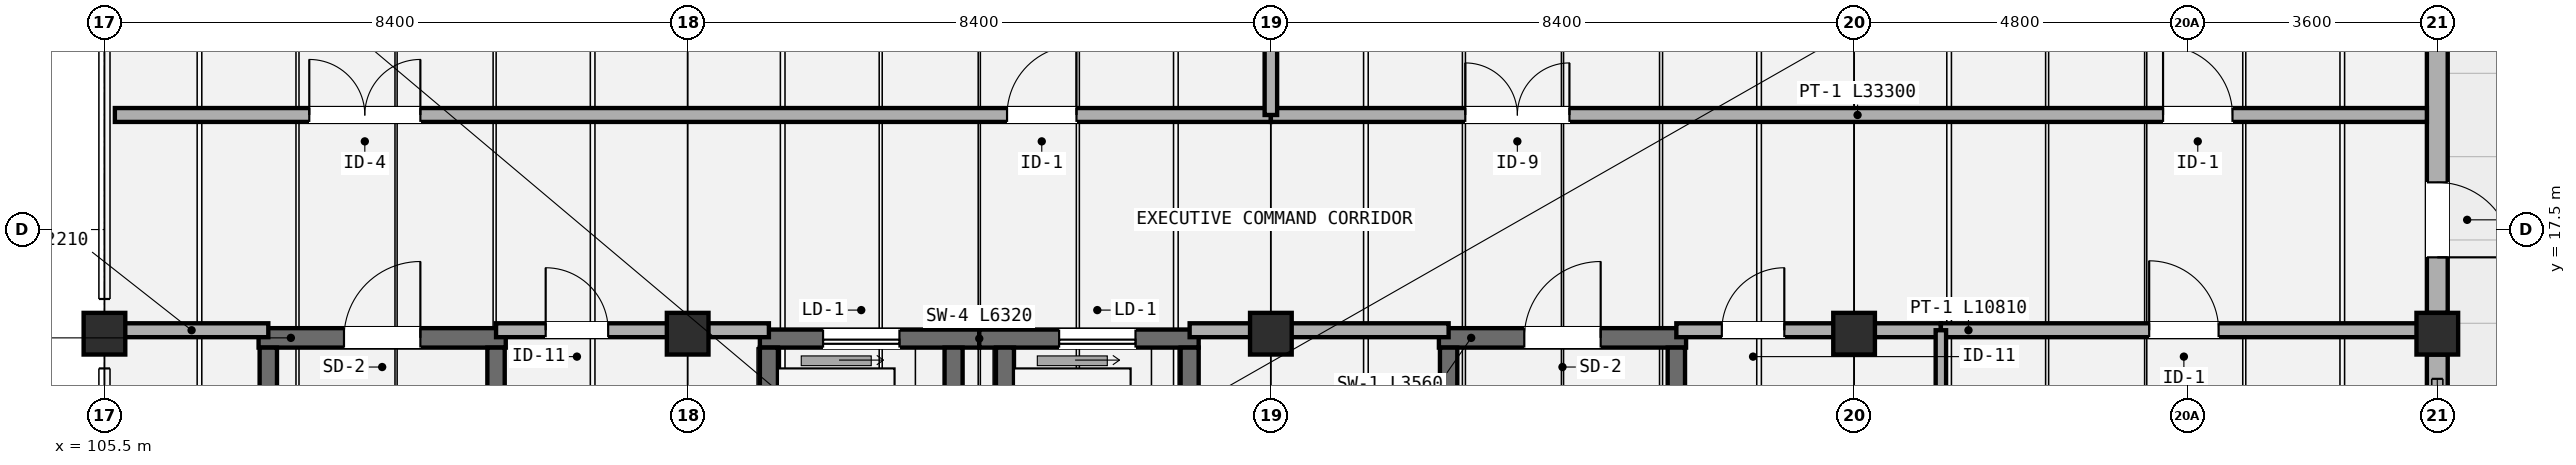
"""IFC4 building model, lengths in metres.
Left out: names, types, materials, properties, quantities, classifications, styles, units other than length and angle.
Written with IfcOpenShell. Run it as: python <this file> out.ifc"""

import sys

from ifc_helpers import new_model, si_unit, direction, frame, frame_2d, origin, origin_2d, place, context, subcontext, project, spatial, rectangle, extrude, element, fill, save


model = new_model("IFC4")
c1 = context("Model", 3, precision=1e-05, world=origin(), true_north=direction((0.0, 1.0)))
c2 = subcontext(c1, "Body", "Model", "MODEL_VIEW")
j1 = project(units=[si_unit("LENGTHUNIT", "METRE"), si_unit("PLANEANGLEUNIT", "RADIAN")], contexts=[c1])
p1 = place(None, origin())
s1 = spatial("IfcSite", under=j1, at=p1, CompositionType="ELEMENT")
p2 = place(p1, origin())
s2 = spatial("IfcBuilding", under=s1, at=p2, CompositionType="ELEMENT")
p3 = place(p2, frame((0.0, 0.0, 12.75)))
s3 = spatial("IfcBuildingStorey", under=s2, at=p3, CompositionType="ELEMENT", Elevation=12.75)
for number, where, z_axis, x_axis in (
    (1, (105.5, 16.0, 0.0), (0.0, 0.0, 1.0), (1.0, 0.0, 0.0)),
    (2, (113.9, 16.0, 0.0), (0.0, 0.0, 1.0), (1.0, 0.0, 0.0)),
    (3, (122.3, 16.0, 0.0), (0.0, 0.0, 1.0), (1.0, 0.0, 0.0)),
    (4, (130.7, 16.0, 0.0), (0.0, 0.0, 1.0), (1.0, 0.0, 0.0)),
    (5, (139.1, 16.0, 0.0), (0.0, 0.0, 1.0), (1.0, 0.0, 0.0)),
):
    element("IfcColumn", number, at=place(p3, frame(where, z_axis=z_axis, x_axis=x_axis)), inside=s3, PredefinedType="COLUMN", context=c2, shape_type="SweptSolid", body=[
        extrude(rectangle(XDim=0.6, YDim=0.6, at=origin_2d()), origin(), (0.0, 0.0, 1.0), 3.0),
    ])
p4 = place(p3, frame((139.1, 9.3, 0.0), z_axis=(0.0, 0.0, 1.0), x_axis=(0.0, 1.0, 0.0)))
e6 = element("IfcWall", 6, at=p4, inside=s3, PredefinedType="STANDARD", context=c2, shape_type="SweptSolid", body=[
    extrude(rectangle(XDim=6.4, YDim=0.3, at=frame_2d((3.2, 0.0))), origin(), (0.0, 0.0, 1.0), 2.35),
])
p5 = place(p3, frame((139.1, 16.3, 0.0), z_axis=(0.0, 0.0, 1.0), x_axis=(0.0, 1.0, 0.0)))
e7 = element("IfcWall", 7, at=p5, inside=s3, PredefinedType="STANDARD", context=c2, shape_type="SweptSolid", body=[
    extrude(rectangle(XDim=7.9, YDim=0.3, at=frame_2d((3.95, 0.0))), origin(), (0.0, 0.0, 1.0), 2.35),
])
p6 = place(p5, frame((0.8, 0.0, 0.0)))
e8 = element("IfcOpeningElement", 8, at=p6, cuts=e7, PredefinedType="OPENING", context=c2, shape_type="SweptSolid", body=[
    extrude(rectangle(XDim=1.08, YDim=2.1, at=frame_2d((0.54, 1.05))), frame((0.0, 0.16, 0.0), z_axis=(0.0, -1.0, 0.0), x_axis=(1.0, 0.0, 0.0)), (0.0, 0.0, 1.0), 0.32),
])
p7 = place(p5, frame((3.95, 0.0, 0.56)))
e9 = element("IfcOpeningElement", 9, at=p7, cuts=e7, PredefinedType="OPENING", context=c2, shape_type="SweptSolid", body=[
    extrude(rectangle(XDim=1.75, YDim=1.55, at=frame_2d((0.875, 0.775))), frame((0.0, 0.16, 0.0), z_axis=(0.0, -1.0, 0.0), x_axis=(1.0, 0.0, 0.0)), (0.0, 0.0, 1.0), 0.32),
])
p8 = place(p3, frame((107.72, 15.94, 0.0), z_axis=(0.0, 0.0, 1.0), x_axis=(1.0, 0.0, 0.0)))
e10 = element("IfcWall", 10, at=p8, inside=s3, PredefinedType="SHEAR", context=c2, shape_type="SweptSolid", body=[
    extrude(rectangle(XDim=3.56, YDim=0.28, at=frame_2d((1.78, 0.0))), origin(), (0.0, 0.0, 1.0), 2.9),
])
p9 = place(p8, frame((1.23, 0.0, 0.0)))
e11 = element("IfcOpeningElement", 11, at=p9, cuts=e10, PredefinedType="OPENING", context=c2, shape_type="SweptSolid", body=[
    extrude(rectangle(XDim=1.1, YDim=2.15, at=frame_2d((0.55, 1.075))), frame((0.0, 0.15, 0.0), z_axis=(0.0, -1.0, 0.0), x_axis=(1.0, 0.0, 0.0)), (0.0, 0.0, 1.0), 0.3),
])
for number, where, z_axis, x_axis in (
    (12, (107.86, 15.8, 0.0), (0.0, 0.0, 1.0), (0.0, -1.0, 0.0)),
    (13, (111.14, 9.5, 0.0), (0.0, 0.0, 1.0), (0.0, 1.0, 0.0)),
):
    element("IfcWall", number, at=place(p3, frame(where, z_axis=z_axis, x_axis=x_axis)), inside=s3, PredefinedType="SHEAR", context=c2, shape_type="SweptSolid", body=[
        extrude(rectangle(XDim=6.3, YDim=0.25, at=frame_2d((3.15, 0.0))), origin(), (0.0, 0.0, 1.0), 2.9),
    ])
p10 = place(p3, frame((124.72, 15.94, 0.0), z_axis=(0.0, 0.0, 1.0), x_axis=(1.0, 0.0, 0.0)))
e14 = element("IfcWall", 14, at=p10, inside=s3, PredefinedType="SHEAR", context=c2, shape_type="SweptSolid", body=[
    extrude(rectangle(XDim=3.56, YDim=0.28, at=frame_2d((1.78, 0.0))), origin(), (0.0, 0.0, 1.0), 2.9),
])
p11 = place(p10, frame((1.23, 0.0, 0.0)))
e15 = element("IfcOpeningElement", 15, at=p11, cuts=e14, PredefinedType="OPENING", context=c2, shape_type="SweptSolid", body=[
    extrude(rectangle(XDim=1.1, YDim=2.15, at=frame_2d((0.55, 1.075))), frame((0.0, 0.15, 0.0), z_axis=(0.0, -1.0, 0.0), x_axis=(1.0, 0.0, 0.0)), (0.0, 0.0, 1.0), 0.3),
])
for number, where, z_axis, x_axis in (
    (16, (124.86, 15.8, 0.0), (0.0, 0.0, 1.0), (0.0, -1.0, 0.0)),
    (17, (128.14, 9.5, 0.0), (0.0, 0.0, 1.0), (0.0, 1.0, 0.0)),
):
    element("IfcWall", number, at=place(p3, frame(where, z_axis=z_axis, x_axis=x_axis)), inside=s3, PredefinedType="SHEAR", context=c2, shape_type="SweptSolid", body=[
        extrude(rectangle(XDim=6.3, YDim=0.25, at=frame_2d((3.15, 0.0))), origin(), (0.0, 0.0, 1.0), 2.9),
    ])
p12 = place(p3, frame((118.1, 15.93, 0.0), z_axis=(0.0, 0.0, 1.0), x_axis=(-1.0, 0.0, 0.0)))
e18 = element("IfcWall", 18, at=p12, inside=s3, PredefinedType="SHEAR", context=c2, shape_type="SweptSolid", body=[
    extrude(rectangle(XDim=3.16, YDim=0.26, at=frame_2d((1.58, 0.0))), origin(), (0.0, 0.0, 1.0), 2.9),
])
p13 = place(p12, frame((1.15, 0.0, 0.0)))
e19 = element("IfcOpeningElement", 19, at=p13, cuts=e18, PredefinedType="OPENING", context=c2, shape_type="SweptSolid", body=[
    extrude(rectangle(XDim=1.1, YDim=2.15, at=frame_2d((0.55, 1.075))), frame((0.0, 0.14, 0.0), z_axis=(0.0, -1.0, 0.0), x_axis=(1.0, 0.0, 0.0)), (0.0, 0.0, 1.0), 0.28),
])
for number, where, z_axis, x_axis in (
    (20, (115.07, 15.8, 0.0), (0.0, 0.0, 1.0), (0.0, -1.0, 0.0)),
    (21, (117.73, 12.8, 0.0), (0.0, 0.0, 1.0), (0.0, 1.0, 0.0)),
):
    element("IfcWall", number, at=place(p3, frame(where, z_axis=z_axis, x_axis=x_axis)), inside=s3, PredefinedType="SHEAR", context=c2, shape_type="SweptSolid", body=[
        extrude(rectangle(XDim=3.0, YDim=0.26, at=frame_2d((1.5, 0.0))), origin(), (0.0, 0.0, 1.0), 2.9),
    ])
p14 = place(p3, frame((121.26, 15.93, 0.0), z_axis=(0.0, 0.0, 1.0), x_axis=(-1.0, 0.0, 0.0)))
e22 = element("IfcWall", 22, at=p14, inside=s3, PredefinedType="SHEAR", context=c2, shape_type="SweptSolid", body=[
    extrude(rectangle(XDim=3.16, YDim=0.26, at=frame_2d((1.58, 0.0))), origin(), (0.0, 0.0, 1.0), 2.9),
])
p15 = place(p14, frame((0.91, 0.0, 0.0)))
e23 = element("IfcOpeningElement", 23, at=p15, cuts=e22, PredefinedType="OPENING", context=c2, shape_type="SweptSolid", body=[
    extrude(rectangle(XDim=1.1, YDim=2.15, at=frame_2d((0.55, 1.075))), frame((0.0, 0.14, 0.0), z_axis=(0.0, -1.0, 0.0), x_axis=(1.0, 0.0, 0.0)), (0.0, 0.0, 1.0), 0.28),
])
for number, where, z_axis, x_axis in (
    (24, (118.47, 15.8, 0.0), (0.0, 0.0, 1.0), (0.0, -1.0, 0.0)),
    (25, (121.13, 12.8, 0.0), (0.0, 0.0, 1.0), (0.0, 1.0, 0.0)),
):
    element("IfcWall", number, at=place(p3, frame(where, z_axis=z_axis, x_axis=x_axis)), inside=s3, PredefinedType="SHEAR", context=c2, shape_type="SweptSolid", body=[
        extrude(rectangle(XDim=3.0, YDim=0.26, at=frame_2d((1.5, 0.0))), origin(), (0.0, 0.0, 1.0), 2.9),
    ])
p16 = place(p3, frame((105.65, 16.05, 0.0), z_axis=(0.0, 0.0, 1.0), x_axis=(1.0, 0.0, 0.0)))
e26 = element("IfcWall", 26, at=p16, inside=s3, PredefinedType="PARTITIONING", context=c2, shape_type="SweptSolid", body=[
    extrude(rectangle(XDim=2.21, YDim=0.2, at=frame_2d((1.105, 0.0))), origin(), (0.0, 0.0, 1.0), 2.3),
])
p17 = place(p3, frame((111.14, 16.05, 0.0), z_axis=(0.0, 0.0, 1.0), x_axis=(1.0, 0.0, 0.0)))
e27 = element("IfcWall", 27, at=p17, inside=s3, PredefinedType="PARTITIONING", context=c2, shape_type="SweptSolid", body=[
    extrude(rectangle(XDim=3.93, YDim=0.2, at=frame_2d((1.965, 0.0))), origin(), (0.0, 0.0, 1.0), 2.3),
])
p18 = place(p17, frame((0.715, 0.0, 0.0)))
e28 = element("IfcOpeningElement", 28, at=p18, cuts=e27, PredefinedType="OPENING", context=c2, shape_type="SweptSolid", body=[
    extrude(rectangle(XDim=0.9, YDim=2.08, at=frame_2d((0.45, 1.04))), frame((0.0, 0.11, 0.0), z_axis=(0.0, -1.0, 0.0), x_axis=(1.0, 0.0, 0.0)), (0.0, 0.0, 1.0), 0.22),
])
p19 = place(p3, frame((121.13, 16.05, 0.0), z_axis=(0.0, 0.0, 1.0), x_axis=(1.0, 0.0, 0.0)))
e29 = element("IfcWall", 29, at=p19, inside=s3, PredefinedType="PARTITIONING", context=c2, shape_type="SweptSolid", body=[
    extrude(rectangle(XDim=3.73, YDim=0.2, at=frame_2d((1.865, 0.0))), origin(), (0.0, 0.0, 1.0), 2.3),
])
p20 = place(p3, frame((128.14, 16.05, 0.0), z_axis=(0.0, 0.0, 1.0), x_axis=(1.0, 0.0, 0.0)))
e30 = element("IfcWall", 30, at=p20, inside=s3, PredefinedType="PARTITIONING", context=c2, shape_type="SweptSolid", body=[
    extrude(rectangle(XDim=3.81, YDim=0.2, at=frame_2d((1.905, 0.0))), origin(), (0.0, 0.0, 1.0), 2.3),
])
p21 = place(p20, frame((0.655, 0.0, 0.0)))
e31 = element("IfcOpeningElement", 31, at=p21, cuts=e30, PredefinedType="OPENING", context=c2, shape_type="SweptSolid", body=[
    extrude(rectangle(XDim=0.9, YDim=2.08, at=frame_2d((0.45, 1.04))), frame((0.0, 0.11, 0.0), z_axis=(0.0, -1.0, 0.0), x_axis=(1.0, 0.0, 0.0)), (0.0, 0.0, 1.0), 0.22),
])
p22 = place(p3, frame((131.95, 16.05, 0.0), z_axis=(0.0, 0.0, 1.0), x_axis=(1.0, 0.0, 0.0)))
e32 = element("IfcWall", 32, at=p22, inside=s3, PredefinedType="PARTITIONING", context=c2, shape_type="SweptSolid", body=[
    extrude(rectangle(XDim=7.0, YDim=0.2, at=frame_2d((3.5, 0.0))), origin(), (0.0, 0.0, 1.0), 2.3),
])
p23 = place(p22, frame((3.0, 0.0, 0.0)))
e33 = element("IfcOpeningElement", 33, at=p23, cuts=e32, PredefinedType="OPENING", context=c2, shape_type="SweptSolid", body=[
    extrude(rectangle(XDim=1.0, YDim=2.12, at=frame_2d((0.5, 1.06))), frame((0.0, 0.11, 0.0), z_axis=(0.0, -1.0, 0.0), x_axis=(1.0, 0.0, 0.0)), (0.0, 0.0, 1.0), 0.22),
])
p24 = place(p3, frame((131.95, 9.15, 0.0), z_axis=(0.0, 0.0, 1.0), x_axis=(0.0, 1.0, 0.0)))
e34 = element("IfcWall", 34, at=p24, inside=s3, PredefinedType="PARTITIONING", context=c2, shape_type="SweptSolid", body=[
    extrude(rectangle(XDim=6.9, YDim=0.15, at=frame_2d((3.45, 0.0))), origin(), (0.0, 0.0, 1.0), 2.3),
])
p25 = place(p3, frame((105.65, 19.15, 0.0), z_axis=(0.0, 0.0, 1.0), x_axis=(1.0, 0.0, 0.0)))
e35 = element("IfcWall", 35, at=p25, inside=s3, PredefinedType="PARTITIONING", context=c2, shape_type="SweptSolid", body=[
    extrude(rectangle(XDim=16.65, YDim=0.2, at=frame_2d((8.325, 0.0))), origin(), (0.0, 0.0, 1.0), 2.3),
])
p26 = place(p25, frame((2.8, 0.0, 0.0)))
e36 = element("IfcOpeningElement", 36, at=p26, cuts=e35, PredefinedType="OPENING", context=c2, shape_type="SweptSolid", body=[
    extrude(rectangle(XDim=1.6, YDim=2.14, at=frame_2d((0.8, 1.07))), frame((0.0, 0.11, 0.0), z_axis=(0.0, -1.0, 0.0), x_axis=(1.0, 0.0, 0.0)), (0.0, 0.0, 1.0), 0.22),
])
p27 = place(p25, frame((12.85, 0.0, 0.0)))
e37 = element("IfcOpeningElement", 37, at=p27, cuts=e35, PredefinedType="OPENING", context=c2, shape_type="SweptSolid", body=[
    extrude(rectangle(XDim=1.0, YDim=2.12, at=frame_2d((0.5, 1.06))), frame((0.0, 0.11, 0.0), z_axis=(0.0, -1.0, 0.0), x_axis=(1.0, 0.0, 0.0)), (0.0, 0.0, 1.0), 0.22),
])
p28 = place(p3, frame((122.3, 19.15, 0.0), z_axis=(0.0, 0.0, 1.0), x_axis=(1.0, 0.0, 0.0)))
e38 = element("IfcWall", 38, at=p28, inside=s3, PredefinedType="PARTITIONING", context=c2, shape_type="SweptSolid", body=[
    extrude(rectangle(XDim=16.65, YDim=0.2, at=frame_2d((8.325, 0.0))), origin(), (0.0, 0.0, 1.0), 2.3),
])
p29 = place(p28, frame((2.8, 0.0, 0.0)))
e39 = element("IfcOpeningElement", 39, at=p29, cuts=e38, PredefinedType="OPENING", context=c2, shape_type="SweptSolid", body=[
    extrude(rectangle(XDim=1.5, YDim=2.15, at=frame_2d((0.75, 1.075))), frame((0.0, 0.11, 0.0), z_axis=(0.0, -1.0, 0.0), x_axis=(1.0, 0.0, 0.0)), (0.0, 0.0, 1.0), 0.22),
])
p30 = place(p28, frame((12.85, 0.0, 0.0)))
e40 = element("IfcOpeningElement", 40, at=p30, cuts=e38, PredefinedType="OPENING", context=c2, shape_type="SweptSolid", body=[
    extrude(rectangle(XDim=1.0, YDim=2.12, at=frame_2d((0.5, 1.06))), frame((0.0, 0.11, 0.0), z_axis=(0.0, -1.0, 0.0), x_axis=(1.0, 0.0, 0.0)), (0.0, 0.0, 1.0), 0.22),
])
p31 = place(p3, frame((122.3, 19.15, 0.0), z_axis=(0.0, 0.0, 1.0), x_axis=(0.0, 1.0, 0.0)))
e41 = element("IfcWall", 41, at=p31, inside=s3, PredefinedType="PARTITIONING", context=c2, shape_type="SweptSolid", body=[
    extrude(rectangle(XDim=13.7, YDim=0.18, at=frame_2d((6.85, 0.0))), origin(), (0.0, 0.0, 1.0), 2.3),
])
p32 = place(p6, frame((1.08, 0.0, 0.0), z_axis=(0.0, 0.0, 1.0), x_axis=(-1.0, 0.0, 0.0)))
e42 = element("IfcDoor", 42, at=p32, inside=s3, OperationType="SINGLE_SWING_LEFT", PredefinedType="DOOR", context=c2, shape_type="SweptSolid", body=[
    extrude(rectangle(XDim=1.08, YDim=2.1, at=frame_2d((0.54, 1.05))), frame((0.0, 0.025, 0.0), z_axis=(0.0, -1.0, 0.0), x_axis=(1.0, 0.0, 0.0)), (0.0, 0.0, 1.0), 0.05),
])
fill(e8, e42)
p33 = place(p9, origin())
e43 = element("IfcDoor", 43, at=p33, inside=s3, OperationType="SINGLE_SWING_RIGHT", PredefinedType="DOOR", context=c2, shape_type="SweptSolid", body=[
    extrude(rectangle(XDim=1.1, YDim=2.15, at=frame_2d((0.55, 1.075))), frame((0.0, 0.025, 0.0), z_axis=(0.0, -1.0, 0.0), x_axis=(1.0, 0.0, 0.0)), (0.0, 0.0, 1.0), 0.05),
])
fill(e11, e43)
p34 = place(p11, origin())
e44 = element("IfcDoor", 44, at=p34, inside=s3, OperationType="SINGLE_SWING_RIGHT", PredefinedType="DOOR", context=c2, shape_type="SweptSolid", body=[
    extrude(rectangle(XDim=1.1, YDim=2.15, at=frame_2d((0.55, 1.075))), frame((0.0, 0.025, 0.0), z_axis=(0.0, -1.0, 0.0), x_axis=(1.0, 0.0, 0.0)), (0.0, 0.0, 1.0), 0.05),
])
fill(e15, e44)
p35 = place(p13, origin())
e45 = element("IfcDoor", 45, at=p35, inside=s3, OperationType="SLIDING_TO_LEFT", PredefinedType="DOOR", context=c2, shape_type="SweptSolid", body=[
    extrude(rectangle(XDim=1.1, YDim=2.15, at=frame_2d((0.55, 1.075))), frame((0.0, 0.025, 0.0), z_axis=(0.0, -1.0, 0.0), x_axis=(1.0, 0.0, 0.0)), (0.0, 0.0, 1.0), 0.05),
])
fill(e19, e45)
p36 = place(p15, origin())
e46 = element("IfcDoor", 46, at=p36, inside=s3, OperationType="SLIDING_TO_LEFT", PredefinedType="DOOR", context=c2, shape_type="SweptSolid", body=[
    extrude(rectangle(XDim=1.1, YDim=2.15, at=frame_2d((0.55, 1.075))), frame((0.0, 0.025, 0.0), z_axis=(0.0, -1.0, 0.0), x_axis=(1.0, 0.0, 0.0)), (0.0, 0.0, 1.0), 0.05),
])
fill(e23, e46)
p37 = place(p18, origin())
e47 = element("IfcDoor", 47, at=p37, inside=s3, OperationType="SINGLE_SWING_LEFT", PredefinedType="DOOR", context=c2, shape_type="SweptSolid", body=[
    extrude(rectangle(XDim=0.9, YDim=2.08, at=frame_2d((0.45, 1.04))), frame((0.0, 0.025, 0.0), z_axis=(0.0, -1.0, 0.0), x_axis=(1.0, 0.0, 0.0)), (0.0, 0.0, 1.0), 0.05),
])
fill(e28, e47)
p38 = place(p21, origin())
e48 = element("IfcDoor", 48, at=p38, inside=s3, OperationType="SINGLE_SWING_RIGHT", PredefinedType="DOOR", context=c2, shape_type="SweptSolid", body=[
    extrude(rectangle(XDim=0.9, YDim=2.08, at=frame_2d((0.45, 1.04))), frame((0.0, 0.025, 0.0), z_axis=(0.0, -1.0, 0.0), x_axis=(1.0, 0.0, 0.0)), (0.0, 0.0, 1.0), 0.05),
])
fill(e31, e48)
p39 = place(p23, origin())
e49 = element("IfcDoor", 49, at=p39, inside=s3, OperationType="SINGLE_SWING_LEFT", PredefinedType="DOOR", context=c2, shape_type="SweptSolid", body=[
    extrude(rectangle(XDim=1.0, YDim=2.12, at=frame_2d((0.5, 1.06))), frame((0.0, 0.025, 0.0), z_axis=(0.0, -1.0, 0.0), x_axis=(1.0, 0.0, 0.0)), (0.0, 0.0, 1.0), 0.05),
])
fill(e33, e49)
p40 = place(p26, origin())
e50 = element("IfcDoor", 50, at=p40, inside=s3, OperationType="DOUBLE_DOOR_SINGLE_SWING", PredefinedType="DOOR", context=c2, shape_type="SweptSolid", body=[
    extrude(rectangle(XDim=1.6, YDim=2.14, at=frame_2d((0.8, 1.07))), frame((0.0, 0.025, 0.0), z_axis=(0.0, -1.0, 0.0), x_axis=(1.0, 0.0, 0.0)), (0.0, 0.0, 1.0), 0.05),
])
fill(e36, e50)
p41 = place(p27, origin())
e51 = element("IfcDoor", 51, at=p41, inside=s3, OperationType="SINGLE_SWING_RIGHT", PredefinedType="DOOR", context=c2, shape_type="SweptSolid", body=[
    extrude(rectangle(XDim=1.0, YDim=2.12, at=frame_2d((0.5, 1.06))), frame((0.0, 0.025, 0.0), z_axis=(0.0, -1.0, 0.0), x_axis=(1.0, 0.0, 0.0)), (0.0, 0.0, 1.0), 0.05),
])
fill(e37, e51)
p42 = place(p29, origin())
e52 = element("IfcDoor", 52, at=p42, inside=s3, OperationType="DOUBLE_DOOR_SINGLE_SWING", PredefinedType="DOOR", context=c2, shape_type="SweptSolid", body=[
    extrude(rectangle(XDim=1.5, YDim=2.15, at=frame_2d((0.75, 1.075))), frame((0.0, 0.025, 0.0), z_axis=(0.0, -1.0, 0.0), x_axis=(1.0, 0.0, 0.0)), (0.0, 0.0, 1.0), 0.05),
])
fill(e39, e52)
p43 = place(p30, origin())
e53 = element("IfcDoor", 53, at=p43, inside=s3, OperationType="SINGLE_SWING_LEFT", PredefinedType="DOOR", context=c2, shape_type="SweptSolid", body=[
    extrude(rectangle(XDim=1.0, YDim=2.12, at=frame_2d((0.5, 1.06))), frame((0.0, 0.025, 0.0), z_axis=(0.0, -1.0, 0.0), x_axis=(1.0, 0.0, 0.0)), (0.0, 0.0, 1.0), 0.05),
])
fill(e40, e53)
save(model, sys.argv[1])
